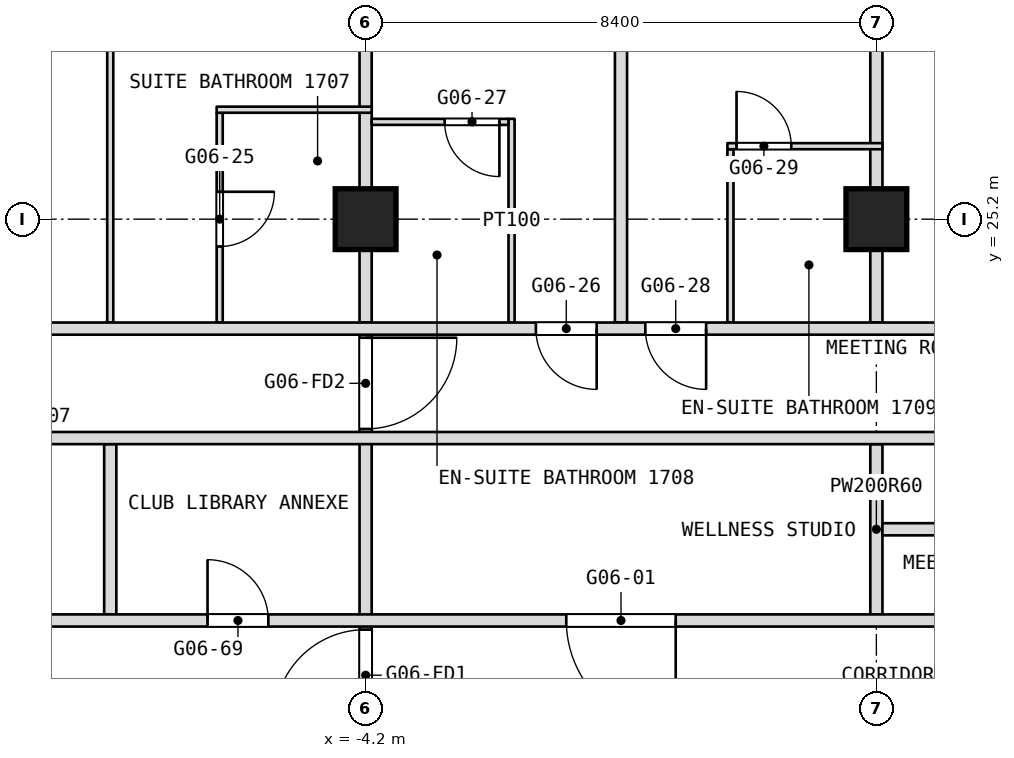
"""IFC4 building model, lengths in metres.
Left out: names, types, materials, properties, quantities, classifications, styles, units other than length and angle.
Written with IfcOpenShell. Run it as: python <this file> out.ifc"""

import sys

from ifc_helpers import new_model, si_unit, direction, frame, frame_2d, origin, origin_2d, place, context, subcontext, project, spatial, rectangle, extrude, element, fill, save


model = new_model("IFC4")
c1 = context("Model", 3, precision=1e-05, world=origin(), true_north=direction((0.0, 1.0)))
c2 = subcontext(c1, "Body", "Model", "MODEL_VIEW")
j1 = project(units=[si_unit("LENGTHUNIT", "METRE"), si_unit("PLANEANGLEUNIT", "RADIAN")], contexts=[c1])
p1 = place(None, origin())
s1 = spatial("IfcSite", under=j1, at=p1, CompositionType="ELEMENT")
p2 = place(p1, origin())
s2 = spatial("IfcBuilding", under=s1, at=p2, CompositionType="ELEMENT")
p3 = place(p2, frame((0.0, 0.0, 76.1)))
s3 = spatial("IfcBuildingStorey", under=s2, at=p3, CompositionType="ELEMENT", Elevation=76.1)
for number, where, z_axis, x_axis in (
    (1, (-4.2, 25.2, 0.0), (0.0, 0.0, 1.0), (1.0, 0.0, 0.0)),
    (2, (4.2, 25.2, 0.0), (0.0, 0.0, 1.0), (1.0, 0.0, 0.0)),
):
    element("IfcColumn", number, at=place(p3, frame(where, z_axis=z_axis, x_axis=x_axis)), inside=s3, PredefinedType="COLUMN", context=c2, shape_type="SweptSolid", body=[
        extrude(rectangle(XDim=1.0, YDim=1.0, at=origin_2d()), origin(), (0.0, 0.0, 1.0), 3.6),
    ])
p4 = place(p3, frame((4.2, 18.7, 0.0), z_axis=(0.0, 0.0, 1.0), x_axis=(0.0, 1.0, 0.0)))
e3 = element("IfcWall", 3, at=p4, inside=s3, PredefinedType="PARTITIONING", context=c2, shape_type="SweptSolid", body=[
    extrude(rectangle(XDim=2.8, YDim=0.2, at=frame_2d((1.4, 0.0))), origin(), (0.0, 0.0, 1.0), 3.34),
])
p5 = place(p3, frame((4.2, 23.5, 0.0), z_axis=(0.0, 0.0, 1.0), x_axis=(0.0, 1.0, 0.0)))
e4 = element("IfcWall", 4, at=p5, inside=s3, PredefinedType="PARTITIONING", context=c2, shape_type="SweptSolid", body=[
    extrude(rectangle(XDim=10.04, YDim=0.2, at=frame_2d((5.02, 0.0))), origin(), (0.0, 0.0, 1.0), 3.34),
])
p6 = place(p3, frame((1.8, 23.5, 0.0), z_axis=(0.0, 0.0, 1.0), x_axis=(0.0, 1.0, 0.0)))
e5 = element("IfcWall", 5, at=p6, inside=s3, PredefinedType="PARTITIONING", context=c2, shape_type="SweptSolid", body=[
    extrude(rectangle(XDim=2.85, YDim=0.1, at=frame_2d((1.425, 0.0))), origin(), (0.0, 0.0, 1.0), 3.34),
])
p7 = place(p3, frame((0.0, 23.5, 0.0), z_axis=(0.0, 0.0, 1.0), x_axis=(0.0, 1.0, 0.0)))
e6 = element("IfcWall", 6, at=p7, inside=s3, PredefinedType="PARTITIONING", context=c2, shape_type="SweptSolid", body=[
    extrude(rectangle(XDim=10.04, YDim=0.2, at=frame_2d((5.02, 0.0))), origin(), (0.0, 0.0, 1.0), 3.34),
])
p8 = place(p3, frame((-1.8, 23.5, 0.0), z_axis=(0.0, 0.0, 1.0), x_axis=(0.0, 1.0, 0.0)))
e7 = element("IfcWall", 7, at=p8, inside=s3, PredefinedType="PARTITIONING", context=c2, shape_type="SweptSolid", body=[
    extrude(rectangle(XDim=3.35, YDim=0.1, at=frame_2d((1.675, 0.0))), origin(), (0.0, 0.0, 1.0), 3.34),
])
p9 = place(p3, frame((-4.2, 16.8, 0.0), z_axis=(0.0, 0.0, 1.0), x_axis=(0.0, 1.0, 0.0)))
e8 = element("IfcWall", 8, at=p9, inside=s3, PredefinedType="PARTITIONING", context=c2, shape_type="SweptSolid", body=[
    extrude(rectangle(XDim=6.7, YDim=0.2, at=frame_2d((3.35, 0.0))), origin(), (0.0, 0.0, 1.0), 3.34),
])
p10 = place(p9, frame((0.15, 0.0, 0.0)))
e9 = element("IfcOpeningElement", 9, at=p10, cuts=e8, PredefinedType="OPENING", context=c2, shape_type="SweptSolid", body=[
    extrude(rectangle(XDim=1.5, YDim=2.1, at=frame_2d((0.75, 1.05))), frame((0.0, 0.1, 0.0), z_axis=(0.0, -1.0, 0.0), x_axis=(1.0, 0.0, 0.0)), (0.0, 0.0, 1.0), 0.2),
])
p11 = place(p9, frame((4.95, 0.0, 0.0)))
e10 = element("IfcOpeningElement", 10, at=p11, cuts=e8, PredefinedType="OPENING", context=c2, shape_type="SweptSolid", body=[
    extrude(rectangle(XDim=1.5, YDim=2.1, at=frame_2d((0.75, 1.05))), frame((0.0, 0.1, 0.0), z_axis=(0.0, -1.0, 0.0), x_axis=(1.0, 0.0, 0.0)), (0.0, 0.0, 1.0), 0.2),
])
p12 = place(p3, frame((-4.2, 23.5, 0.0), z_axis=(0.0, 0.0, 1.0), x_axis=(0.0, 1.0, 0.0)))
e11 = element("IfcWall", 11, at=p12, inside=s3, PredefinedType="PARTITIONING", context=c2, shape_type="SweptSolid", body=[
    extrude(rectangle(XDim=10.04, YDim=0.2, at=frame_2d((5.02, 0.0))), origin(), (0.0, 0.0, 1.0), 3.34),
])
p13 = place(p3, frame((-6.6, 23.5, 0.0), z_axis=(0.0, 0.0, 1.0), x_axis=(0.0, 1.0, 0.0)))
e12 = element("IfcWall", 12, at=p13, inside=s3, PredefinedType="PARTITIONING", context=c2, shape_type="SweptSolid", body=[
    extrude(rectangle(XDim=3.45, YDim=0.1, at=frame_2d((1.725, 0.0))), origin(), (0.0, 0.0, 1.0), 3.34),
])
p14 = place(p13, frame((1.25, 0.0, 0.0)))
e13 = element("IfcOpeningElement", 13, at=p14, cuts=e12, PredefinedType="OPENING", context=c2, shape_type="SweptSolid", body=[
    extrude(rectangle(XDim=0.9, YDim=2.1, at=frame_2d((0.45, 1.05))), frame((0.0, 0.05, 0.0), z_axis=(0.0, -1.0, 0.0), x_axis=(1.0, 0.0, 0.0)), (0.0, 0.0, 1.0), 0.1),
])
p15 = place(p3, frame((-8.4, 18.7, 0.0), z_axis=(0.0, 0.0, 1.0), x_axis=(0.0, 1.0, 0.0)))
e14 = element("IfcWall", 14, at=p15, inside=s3, PredefinedType="PARTITIONING", context=c2, shape_type="SweptSolid", body=[
    extrude(rectangle(XDim=2.8, YDim=0.2, at=frame_2d((1.4, 0.0))), origin(), (0.0, 0.0, 1.0), 3.34),
])
p16 = place(p3, frame((-8.4, 23.5, 0.0), z_axis=(0.0, 0.0, 1.0), x_axis=(0.0, 1.0, 0.0)))
e15 = element("IfcWall", 15, at=p16, inside=s3, PredefinedType="PARTITIONING", context=c2, shape_type="SweptSolid", body=[
    extrude(rectangle(XDim=10.04, YDim=0.1, at=frame_2d((5.02, 0.0))), origin(), (0.0, 0.0, 1.0), 3.34),
])
p17 = place(p16, frame((5.57, 0.0, 0.0)))
e16 = element("IfcOpeningElement", 16, at=p17, cuts=e15, PredefinedType="OPENING", context=c2, shape_type="SweptSolid", body=[
    extrude(rectangle(XDim=0.9, YDim=2.1, at=frame_2d((0.45, 1.05))), frame((0.0, 0.05, 0.0), z_axis=(0.0, -1.0, 0.0), x_axis=(1.0, 0.0, 0.0)), (0.0, 0.0, 1.0), 0.1),
])
p18 = place(p3, frame((-16.9, 18.6, 0.0), z_axis=(0.0, 0.0, 1.0), x_axis=(1.0, 0.0, 0.0)))
e17 = element("IfcWall", 17, at=p18, inside=s3, PredefinedType="PARTITIONING", context=c2, shape_type="SweptSolid", body=[
    extrude(rectangle(XDim=25.1, YDim=0.2, at=frame_2d((12.55, 0.0))), origin(), (0.0, 0.0, 1.0), 3.34),
])
p19 = place(p18, frame((16.0, 0.0, 0.0)))
e18 = element("IfcOpeningElement", 18, at=p19, cuts=e17, PredefinedType="OPENING", context=c2, shape_type="SweptSolid", body=[
    extrude(rectangle(XDim=1.8, YDim=2.1, at=frame_2d((0.9, 1.05))), frame((0.0, 0.1, 0.0), z_axis=(0.0, -1.0, 0.0), x_axis=(1.0, 0.0, 0.0)), (0.0, 0.0, 1.0), 0.2),
])
p20 = place(p18, frame((5.9, 0.0, 0.0)))
e19 = element("IfcOpeningElement", 19, at=p20, cuts=e17, PredefinedType="OPENING", context=c2, shape_type="SweptSolid", body=[
    extrude(rectangle(XDim=1.0, YDim=2.1, at=frame_2d((0.5, 1.05))), frame((0.0, 0.1, 0.0), z_axis=(0.0, -1.0, 0.0), x_axis=(1.0, 0.0, 0.0)), (0.0, 0.0, 1.0), 0.2),
])
p21 = place(p18, frame((10.1, 0.0, 0.0)))
e20 = element("IfcOpeningElement", 20, at=p21, cuts=e17, PredefinedType="OPENING", context=c2, shape_type="SweptSolid", body=[
    extrude(rectangle(XDim=1.0, YDim=2.1, at=frame_2d((0.5, 1.05))), frame((0.0, 0.1, 0.0), z_axis=(0.0, -1.0, 0.0), x_axis=(1.0, 0.0, 0.0)), (0.0, 0.0, 1.0), 0.2),
])
p22 = place(p18, frame((1.7, 0.0, 0.0)))
e21 = element("IfcOpeningElement", 21, at=p22, cuts=e17, PredefinedType="OPENING", context=c2, shape_type="SweptSolid", body=[
    extrude(rectangle(XDim=1.0, YDim=2.1, at=frame_2d((0.5, 1.05))), frame((0.0, 0.1, 0.0), z_axis=(0.0, -1.0, 0.0), x_axis=(1.0, 0.0, 0.0)), (0.0, 0.0, 1.0), 0.2),
])
p23 = place(p18, frame((22.55, 0.0, 0.0)))
e22 = element("IfcOpeningElement", 22, at=p23, cuts=e17, PredefinedType="OPENING", context=c2, shape_type="SweptSolid", body=[
    extrude(rectangle(XDim=1.0, YDim=2.1, at=frame_2d((0.5, 1.05))), frame((0.0, 0.1, 0.0), z_axis=(0.0, -1.0, 0.0), x_axis=(1.0, 0.0, 0.0)), (0.0, 0.0, 1.0), 0.2),
])
p24 = place(p3, frame((4.3, 20.1, 0.0), z_axis=(0.0, 0.0, 1.0), x_axis=(1.0, 0.0, 0.0)))
e23 = element("IfcWall", 23, at=p24, inside=s3, PredefinedType="PARTITIONING", context=c2, shape_type="SweptSolid", body=[
    extrude(rectangle(XDim=3.7, YDim=0.2, at=frame_2d((1.85, 0.0))), origin(), (0.0, 0.0, 1.0), 3.34),
])
p25 = place(p3, frame((-16.7, 21.6, 0.0), z_axis=(0.0, 0.0, 1.0), x_axis=(1.0, 0.0, 0.0)))
e24 = element("IfcWall", 24, at=p25, inside=s3, PredefinedType="PARTITIONING", context=c2, shape_type="SweptSolid", body=[
    extrude(rectangle(XDim=24.7, YDim=0.2, at=frame_2d((12.35, 0.0))), origin(), (0.0, 0.0, 1.0), 3.34),
])
p26 = place(p25, frame((1.6, 0.0, 0.0)))
e25 = element("IfcOpeningElement", 25, at=p26, cuts=e24, PredefinedType="OPENING", context=c2, shape_type="SweptSolid", body=[
    extrude(rectangle(XDim=1.0, YDim=2.1, at=frame_2d((0.5, 1.05))), frame((0.0, 0.1, 0.0), z_axis=(0.0, -1.0, 0.0), x_axis=(1.0, 0.0, 0.0)), (0.0, 0.0, 1.0), 0.2),
])
p27 = place(p25, frame((22.25, 0.0, 0.0)))
e26 = element("IfcOpeningElement", 26, at=p27, cuts=e24, PredefinedType="OPENING", context=c2, shape_type="SweptSolid", body=[
    extrude(rectangle(XDim=1.0, YDim=2.1, at=frame_2d((0.5, 1.05))), frame((0.0, 0.1, 0.0), z_axis=(0.0, -1.0, 0.0), x_axis=(1.0, 0.0, 0.0)), (0.0, 0.0, 1.0), 0.2),
])
p28 = place(p3, frame((-16.7, 23.4, 0.0), z_axis=(0.0, 0.0, 1.0), x_axis=(1.0, 0.0, 0.0)))
e27 = element("IfcWall", 27, at=p28, inside=s3, PredefinedType="PARTITIONING", context=c2, shape_type="SweptSolid", body=[
    extrude(rectangle(XDim=23.4, YDim=0.2, at=frame_2d((11.7, 0.0))), origin(), (0.0, 0.0, 1.0), 3.34),
])
p29 = place(p28, frame((2.4, 0.0, 0.0)))
e28 = element("IfcOpeningElement", 28, at=p29, cuts=e27, PredefinedType="OPENING", context=c2, shape_type="SweptSolid", body=[
    extrude(rectangle(XDim=0.9, YDim=2.1, at=frame_2d((0.45, 1.05))), frame((0.0, 0.1, 0.0), z_axis=(0.0, -1.0, 0.0), x_axis=(1.0, 0.0, 0.0)), (0.0, 0.0, 1.0), 0.2),
])
p30 = place(p28, frame((5.65, 0.0, 0.0)))
e29 = element("IfcOpeningElement", 29, at=p30, cuts=e27, PredefinedType="OPENING", context=c2, shape_type="SweptSolid", body=[
    extrude(rectangle(XDim=1.1, YDim=2.1, at=frame_2d((0.55, 1.05))), frame((0.0, 0.1, 0.0), z_axis=(0.0, -1.0, 0.0), x_axis=(1.0, 0.0, 0.0)), (0.0, 0.0, 1.0), 0.2),
])
p31 = place(p28, frame((15.3, 0.0, 0.0)))
e30 = element("IfcOpeningElement", 30, at=p31, cuts=e27, PredefinedType="OPENING", context=c2, shape_type="SweptSolid", body=[
    extrude(rectangle(XDim=1.0, YDim=2.1, at=frame_2d((0.5, 1.05))), frame((0.0, 0.1, 0.0), z_axis=(0.0, -1.0, 0.0), x_axis=(1.0, 0.0, 0.0)), (0.0, 0.0, 1.0), 0.2),
])
p32 = place(p28, frame((17.1, 0.0, 0.0)))
e31 = element("IfcOpeningElement", 31, at=p32, cuts=e27, PredefinedType="OPENING", context=c2, shape_type="SweptSolid", body=[
    extrude(rectangle(XDim=1.0, YDim=2.1, at=frame_2d((0.5, 1.05))), frame((0.0, 0.1, 0.0), z_axis=(0.0, -1.0, 0.0), x_axis=(1.0, 0.0, 0.0)), (0.0, 0.0, 1.0), 0.2),
])
p33 = place(p3, frame((1.75, 26.4, 0.0), z_axis=(0.0, 0.0, 1.0), x_axis=(1.0, 0.0, 0.0)))
e32 = element("IfcWall", 32, at=p33, inside=s3, PredefinedType="PARTITIONING", context=c2, shape_type="SweptSolid", body=[
    extrude(rectangle(XDim=2.55, YDim=0.1, at=frame_2d((1.275, 0.0))), origin(), (0.0, 0.0, 1.0), 3.34),
])
p34 = place(p33, frame((0.15, 0.0, 0.0)))
e33 = element("IfcOpeningElement", 33, at=p34, cuts=e32, PredefinedType="OPENING", context=c2, shape_type="SweptSolid", body=[
    extrude(rectangle(XDim=0.9, YDim=2.1, at=frame_2d((0.45, 1.05))), frame((0.0, 0.05, 0.0), z_axis=(0.0, -1.0, 0.0), x_axis=(1.0, 0.0, 0.0)), (0.0, 0.0, 1.0), 0.1),
])
p35 = place(p3, frame((-4.1, 26.8, 0.0), z_axis=(0.0, 0.0, 1.0), x_axis=(1.0, 0.0, 0.0)))
e34 = element("IfcWall", 34, at=p35, inside=s3, PredefinedType="PARTITIONING", context=c2, shape_type="SweptSolid", body=[
    extrude(rectangle(XDim=2.25, YDim=0.1, at=frame_2d((1.125, 0.0))), origin(), (0.0, 0.0, 1.0), 3.34),
])
p36 = place(p35, frame((1.2, 0.0, 0.0)))
e35 = element("IfcOpeningElement", 35, at=p36, cuts=e34, PredefinedType="OPENING", context=c2, shape_type="SweptSolid", body=[
    extrude(rectangle(XDim=0.9, YDim=2.1, at=frame_2d((0.45, 1.05))), frame((0.0, 0.05, 0.0), z_axis=(0.0, -1.0, 0.0), x_axis=(1.0, 0.0, 0.0)), (0.0, 0.0, 1.0), 0.1),
])
p37 = place(p3, frame((-6.65, 27.0, 0.0), z_axis=(0.0, 0.0, 1.0), x_axis=(1.0, 0.0, 0.0)))
e36 = element("IfcWall", 36, at=p37, inside=s3, PredefinedType="PARTITIONING", context=c2, shape_type="SweptSolid", body=[
    extrude(rectangle(XDim=2.55, YDim=0.1, at=frame_2d((1.275, 0.0))), origin(), (0.0, 0.0, 1.0), 3.34),
])
p38 = place(p14, origin())
e37 = element("IfcDoor", 37, at=p38, inside=s3, OperationType="SINGLE_SWING_RIGHT", PredefinedType="DOOR", context=c2, shape_type="SweptSolid", body=[
    extrude(rectangle(XDim=0.9, YDim=2.1, at=frame_2d((0.45, 1.05))), frame((0.0, 0.025, 0.0), z_axis=(0.0, -1.0, 0.0), x_axis=(1.0, 0.0, 0.0)), (0.0, 0.0, 1.0), 0.05),
])
fill(e13, e37)
p39 = place(p19, origin())
e38 = element("IfcDoor", 38, at=p39, inside=s3, OperationType="DOUBLE_DOOR_SINGLE_SWING", PredefinedType="DOOR", context=c2, shape_type="SweptSolid", body=[
    extrude(rectangle(XDim=1.8, YDim=2.1, at=frame_2d((0.9, 1.05))), frame((0.0, 0.025, 0.0), z_axis=(0.0, -1.0, 0.0), x_axis=(1.0, 0.0, 0.0)), (0.0, 0.0, 1.0), 0.05),
])
fill(e18, e38)
p40 = place(p21, origin())
e39 = element("IfcDoor", 39, at=p40, inside=s3, OperationType="SINGLE_SWING_LEFT", PredefinedType="DOOR", context=c2, shape_type="SweptSolid", body=[
    extrude(rectangle(XDim=1.0, YDim=2.1, at=frame_2d((0.5, 1.05))), frame((0.0, 0.025, 0.0), z_axis=(0.0, -1.0, 0.0), x_axis=(1.0, 0.0, 0.0)), (0.0, 0.0, 1.0), 0.05),
])
fill(e20, e39)
p41 = place(p31, origin())
e40 = element("IfcDoor", 40, at=p41, inside=s3, OperationType="SINGLE_SWING_LEFT", PredefinedType="DOOR", context=c2, shape_type="SweptSolid", body=[
    extrude(rectangle(XDim=1.0, YDim=2.1, at=frame_2d((0.5, 1.05))), frame((0.0, 0.025, 0.0), z_axis=(0.0, -1.0, 0.0), x_axis=(1.0, 0.0, 0.0)), (0.0, 0.0, 1.0), 0.05),
])
fill(e30, e40)
p42 = place(p32, origin())
e41 = element("IfcDoor", 41, at=p42, inside=s3, OperationType="SINGLE_SWING_LEFT", PredefinedType="DOOR", context=c2, shape_type="SweptSolid", body=[
    extrude(rectangle(XDim=1.0, YDim=2.1, at=frame_2d((0.5, 1.05))), frame((0.0, 0.025, 0.0), z_axis=(0.0, -1.0, 0.0), x_axis=(1.0, 0.0, 0.0)), (0.0, 0.0, 1.0), 0.05),
])
fill(e31, e41)
p43 = place(p34, origin())
e42 = element("IfcDoor", 42, at=p43, inside=s3, OperationType="SINGLE_SWING_RIGHT", PredefinedType="DOOR", context=c2, shape_type="SweptSolid", body=[
    extrude(rectangle(XDim=0.9, YDim=2.1, at=frame_2d((0.45, 1.05))), frame((0.0, 0.025, 0.0), z_axis=(0.0, -1.0, 0.0), x_axis=(1.0, 0.0, 0.0)), (0.0, 0.0, 1.0), 0.05),
])
fill(e33, e42)
p44 = place(p36, origin())
e43 = element("IfcDoor", 43, at=p44, inside=s3, OperationType="SINGLE_SWING_LEFT", PredefinedType="DOOR", context=c2, shape_type="SweptSolid", body=[
    extrude(rectangle(XDim=0.9, YDim=2.1, at=frame_2d((0.45, 1.05))), frame((0.0, 0.025, 0.0), z_axis=(0.0, -1.0, 0.0), x_axis=(1.0, 0.0, 0.0)), (0.0, 0.0, 1.0), 0.05),
])
fill(e35, e43)
p45 = place(p10, origin())
e44 = element("IfcDoor", 44, at=p45, inside=s3, OperationType="DOUBLE_DOOR_DOUBLE_SWING", PredefinedType="DOOR", context=c2, shape_type="SweptSolid", body=[
    extrude(rectangle(XDim=1.5, YDim=2.1, at=frame_2d((0.75, 1.05))), frame((0.0, 0.025, 0.0), z_axis=(0.0, -1.0, 0.0), x_axis=(1.0, 0.0, 0.0)), (0.0, 0.0, 1.0), 0.05),
])
fill(e9, e44)
p46 = place(p11, origin())
e45 = element("IfcDoor", 45, at=p46, inside=s3, OperationType="DOUBLE_DOOR_DOUBLE_SWING", PredefinedType="DOOR", context=c2, shape_type="SweptSolid", body=[
    extrude(rectangle(XDim=1.5, YDim=2.1, at=frame_2d((0.75, 1.05))), frame((0.0, 0.025, 0.0), z_axis=(0.0, -1.0, 0.0), x_axis=(1.0, 0.0, 0.0)), (0.0, 0.0, 1.0), 0.05),
])
fill(e10, e45)
save(model, sys.argv[1])
